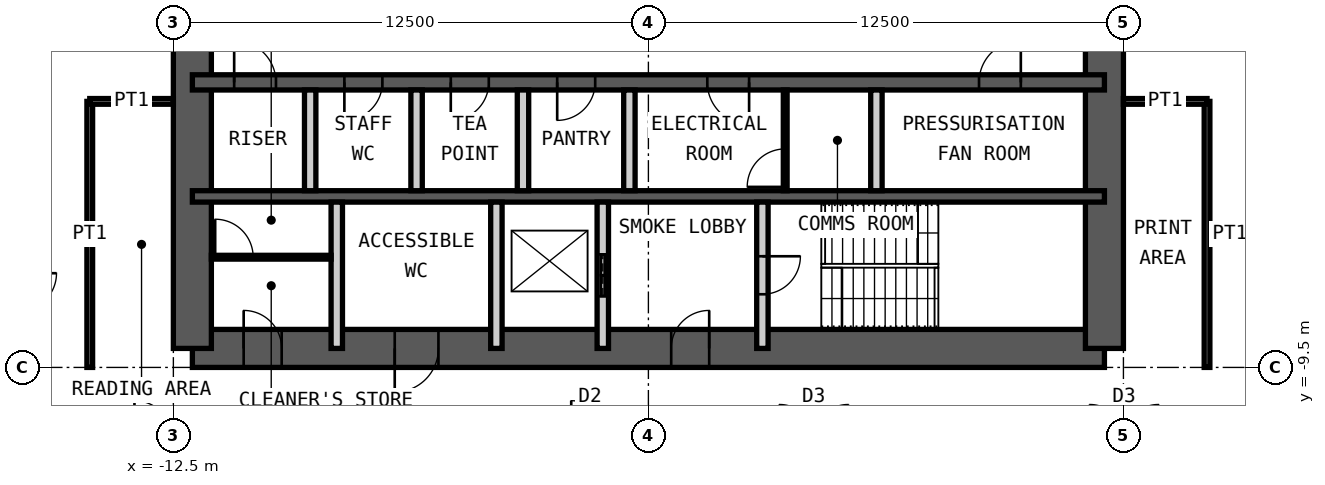
"""IFC4 building model, lengths in metres.
Left out: names, types, materials, properties, quantities, classifications, styles, units other than length and angle.
Written with IfcOpenShell. Run it as: python <this file> out.ifc"""

import sys

from ifc_helpers import new_model, si_unit, direction, frame, frame_2d, origin, place, context, subcontext, project, spatial, rectangle, extrude, element, fill, save


model = new_model("IFC4")
c1 = context("Model", 3, precision=1e-05, world=origin(), true_north=direction((0.0, 1.0)))
c2 = subcontext(c1, "Body", "Model", "MODEL_VIEW")
j1 = project(units=[si_unit("LENGTHUNIT", "METRE"), si_unit("PLANEANGLEUNIT", "RADIAN")], contexts=[c1])
p1 = place(None, origin())
s1 = spatial("IfcSite", under=j1, at=p1, CompositionType="ELEMENT")
p2 = place(p1, origin())
s2 = spatial("IfcBuilding", under=s1, at=p2, CompositionType="ELEMENT")
p3 = place(p2, frame((0.0, 0.0, 291.4)))
s3 = spatial("IfcBuildingStorey", under=s2, at=p3, CompositionType="ELEMENT", Elevation=291.4)
p4 = place(p3, frame((-12.0, -9.0, 0.0), z_axis=(0.0, 0.0, 1.0), x_axis=(1.0, 0.0, 0.0)))
e1 = element("IfcWall", 1, at=p4, inside=s3, PredefinedType="SHEAR", context=c2, shape_type="SweptSolid", body=[
    extrude(rectangle(XDim=24.0, YDim=1.0, at=frame_2d((12.0, 0.0))), origin(), (0.0, 0.0, 1.0), 4.2),
])
p5 = place(p4, frame((1.35, 0.0, 0.0)))
e2 = element("IfcOpeningElement", 2, at=p5, cuts=e1, PredefinedType="OPENING", context=c2, shape_type="SweptSolid", body=[
    extrude(rectangle(XDim=1.0, YDim=2.1, at=frame_2d((0.5, 1.05))), frame((0.0, 0.51, 0.0), z_axis=(0.0, -1.0, 0.0), x_axis=(1.0, 0.0, 0.0)), (0.0, 0.0, 1.0), 1.02),
])
p6 = place(p4, frame((5.325, 0.0, 0.0)))
e3 = element("IfcOpeningElement", 3, at=p6, cuts=e1, PredefinedType="OPENING", context=c2, shape_type="SweptSolid", body=[
    extrude(rectangle(XDim=1.15, YDim=2.1, at=frame_2d((0.575, 1.05))), frame((0.0, 0.51, 0.0), z_axis=(0.0, -1.0, 0.0), x_axis=(1.0, 0.0, 0.0)), (0.0, 0.0, 1.0), 1.02),
])
p7 = place(p4, frame((12.6, 0.0, 0.0)))
e4 = element("IfcOpeningElement", 4, at=p7, cuts=e1, PredefinedType="OPENING", context=c2, shape_type="SweptSolid", body=[
    extrude(rectangle(XDim=1.0, YDim=2.1, at=frame_2d((0.5, 1.05))), frame((0.0, 0.51, 0.0), z_axis=(0.0, -1.0, 0.0), x_axis=(1.0, 0.0, 0.0)), (0.0, 0.0, 1.0), 1.02),
])
p8 = place(p3, frame((12.0, -9.0, 0.0), z_axis=(0.0, 0.0, 1.0), x_axis=(0.0, 1.0, 0.0)))
e5 = element("IfcWall", 5, at=p8, inside=s3, PredefinedType="SHEAR", context=c2, shape_type="SweptSolid", body=[
    extrude(rectangle(XDim=18.0, YDim=1.0, at=frame_2d((9.0, 0.0))), origin(), (0.0, 0.0, 1.0), 4.2),
])
p9 = place(p8, frame((8.1, 0.0, 0.0)))
e6 = element("IfcOpeningElement", 6, at=p9, cuts=e5, PredefinedType="OPENING", context=c2, shape_type="SweptSolid", body=[
    extrude(rectangle(XDim=1.8, YDim=2.1, at=frame_2d((0.9, 1.05))), frame((0.0, 0.51, 0.0), z_axis=(0.0, -1.0, 0.0), x_axis=(1.0, 0.0, 0.0)), (0.0, 0.0, 1.0), 1.02),
])
p10 = place(p3, frame((-12.0, -9.0, 0.0), z_axis=(0.0, 0.0, 1.0), x_axis=(0.0, 1.0, 0.0)))
e7 = element("IfcWall", 7, at=p10, inside=s3, PredefinedType="SHEAR", context=c2, shape_type="SweptSolid", body=[
    extrude(rectangle(XDim=18.0, YDim=1.0, at=frame_2d((9.0, 0.0))), origin(), (0.0, 0.0, 1.0), 4.2),
])
p11 = place(p10, frame((8.1, 0.0, 0.0)))
e8 = element("IfcOpeningElement", 8, at=p11, cuts=e7, PredefinedType="OPENING", context=c2, shape_type="SweptSolid", body=[
    extrude(rectangle(XDim=1.8, YDim=2.1, at=frame_2d((0.9, 1.05))), frame((0.0, 0.51, 0.0), z_axis=(0.0, -1.0, 0.0), x_axis=(1.0, 0.0, 0.0)), (0.0, 0.0, 1.0), 1.02),
])
p12 = place(p3, frame((-12.0, -2.0, 0.0), z_axis=(0.0, 0.0, 1.0), x_axis=(1.0, 0.0, 0.0)))
e9 = element("IfcWall", 9, at=p12, inside=s3, PredefinedType="SHEAR", context=c2, shape_type="SweptSolid", body=[
    extrude(rectangle(XDim=24.0, YDim=0.4, at=frame_2d((12.0, 0.0))), origin(), (0.0, 0.0, 1.0), 4.2),
])
p13 = place(p12, frame((1.1, 0.0, 0.0)))
e10 = element("IfcOpeningElement", 10, at=p13, cuts=e9, PredefinedType="OPENING", context=c2, shape_type="SweptSolid", body=[
    extrude(rectangle(XDim=1.1, YDim=2.1, at=frame_2d((0.55, 1.05))), frame((0.0, 0.21, 0.0), z_axis=(0.0, -1.0, 0.0), x_axis=(1.0, 0.0, 0.0)), (0.0, 0.0, 1.0), 0.42),
])
p14 = place(p12, frame((13.55, 0.0, 0.0)))
e11 = element("IfcOpeningElement", 11, at=p14, cuts=e9, PredefinedType="OPENING", context=c2, shape_type="SweptSolid", body=[
    extrude(rectangle(XDim=1.1, YDim=2.1, at=frame_2d((0.55, 1.05))), frame((0.0, 0.21, 0.0), z_axis=(0.0, -1.0, 0.0), x_axis=(1.0, 0.0, 0.0)), (0.0, 0.0, 1.0), 0.42),
])
p15 = place(p12, frame((20.7, 0.0, 0.0)))
e12 = element("IfcOpeningElement", 12, at=p15, cuts=e9, PredefinedType="OPENING", context=c2, shape_type="SweptSolid", body=[
    extrude(rectangle(XDim=1.1, YDim=2.1, at=frame_2d((0.55, 1.05))), frame((0.0, 0.21, 0.0), z_axis=(0.0, -1.0, 0.0), x_axis=(1.0, 0.0, 0.0)), (0.0, 0.0, 1.0), 0.42),
])
p16 = place(p12, frame((4.0, 0.0, 0.0)))
e13 = element("IfcOpeningElement", 13, at=p16, cuts=e9, PredefinedType="OPENING", context=c2, shape_type="SweptSolid", body=[
    extrude(rectangle(XDim=1.0, YDim=2.1, at=frame_2d((0.5, 1.05))), frame((0.0, 0.21, 0.0), z_axis=(0.0, -1.0, 0.0), x_axis=(1.0, 0.0, 0.0)), (0.0, 0.0, 1.0), 0.42),
])
p17 = place(p12, frame((6.8, 0.0, 0.0)))
e14 = element("IfcOpeningElement", 14, at=p17, cuts=e9, PredefinedType="OPENING", context=c2, shape_type="SweptSolid", body=[
    extrude(rectangle(XDim=1.0, YDim=2.1, at=frame_2d((0.5, 1.05))), frame((0.0, 0.21, 0.0), z_axis=(0.0, -1.0, 0.0), x_axis=(1.0, 0.0, 0.0)), (0.0, 0.0, 1.0), 0.42),
])
p18 = place(p12, frame((9.6, 0.0, 0.0)))
e15 = element("IfcOpeningElement", 15, at=p18, cuts=e9, PredefinedType="OPENING", context=c2, shape_type="SweptSolid", body=[
    extrude(rectangle(XDim=1.0, YDim=2.1, at=frame_2d((0.5, 1.05))), frame((0.0, 0.21, 0.0), z_axis=(0.0, -1.0, 0.0), x_axis=(1.0, 0.0, 0.0)), (0.0, 0.0, 1.0), 0.42),
])
p19 = place(p3, frame((-12.0, -5.0, 0.0), z_axis=(0.0, 0.0, 1.0), x_axis=(1.0, 0.0, 0.0)))
e16 = element("IfcWall", 16, at=p19, inside=s3, PredefinedType="SHEAR", context=c2, shape_type="SweptSolid", body=[
    extrude(rectangle(XDim=24.0, YDim=0.3, at=frame_2d((12.0, 0.0))), origin(), (0.0, 0.0, 1.0), 4.2),
])
for number, where, z_axis, x_axis in (
    (17, (-8.9, -4.85, 0.0), (0.0, 0.0, 1.0), (0.0, 1.0, 0.0)),
    (18, (-6.1, -4.85, 0.0), (0.0, 0.0, 1.0), (0.0, 1.0, 0.0)),
    (19, (-3.3, -4.85, 0.0), (0.0, 0.0, 1.0), (0.0, 1.0, 0.0)),
    (20, (-0.5, -4.85, 0.0), (0.0, 0.0, 1.0), (0.0, 1.0, 0.0)),
    (21, (6.0, -4.85, 0.0), (0.0, 0.0, 1.0), (0.0, 1.0, 0.0)),
):
    element("IfcWall", number, at=place(p3, frame(where, z_axis=z_axis, x_axis=x_axis)), inside=s3, PredefinedType="PARTITIONING", context=c2, shape_type="SweptSolid", body=[
        extrude(rectangle(XDim=2.65, YDim=0.3, at=frame_2d((1.325, 0.0))), origin(), (0.0, 0.0, 1.0), 3.98),
    ])
for number, where, z_axis, x_axis in (
    (22, (-8.2, -9.0, 0.0), (0.0, 0.0, 1.0), (0.0, 1.0, 0.0)),
    (23, (-4.0, -9.0, 0.0), (0.0, 0.0, 1.0), (0.0, 1.0, 0.0)),
):
    element("IfcWall", number, at=place(p3, frame(where, z_axis=z_axis, x_axis=x_axis)), inside=s3, PredefinedType="PARTITIONING", context=c2, shape_type="SweptSolid", body=[
        extrude(rectangle(XDim=3.85, YDim=0.3, at=frame_2d((1.925, 0.0))), origin(), (0.0, 0.0, 1.0), 3.98),
    ])
p20 = place(p3, frame((-1.2, -9.0, 0.0), z_axis=(0.0, 0.0, 1.0), x_axis=(0.0, 1.0, 0.0)))
e24 = element("IfcWall", 24, at=p20, inside=s3, PredefinedType="PARTITIONING", context=c2, shape_type="SweptSolid", body=[
    extrude(rectangle(XDim=3.85, YDim=0.3, at=frame_2d((1.925, 0.0))), origin(), (0.0, 0.0, 1.0), 3.98),
])
p21 = place(p20, frame((1.375, 0.0, 0.0)))
e25 = element("IfcOpeningElement", 25, at=p21, cuts=e24, PredefinedType="OPENING", context=c2, shape_type="SweptSolid", body=[
    extrude(rectangle(XDim=1.1, YDim=2.4, at=frame_2d((0.55, 1.2))), frame((0.0, 0.16, 0.0), z_axis=(0.0, -1.0, 0.0), x_axis=(1.0, 0.0, 0.0)), (0.0, 0.0, 1.0), 0.32),
])
p22 = place(p3, frame((3.0, -9.0, 0.0), z_axis=(0.0, 0.0, 1.0), x_axis=(0.0, 1.0, 0.0)))
e26 = element("IfcWall", 26, at=p22, inside=s3, PredefinedType="PARTITIONING", context=c2, shape_type="SweptSolid", body=[
    extrude(rectangle(XDim=3.85, YDim=0.3, at=frame_2d((1.925, 0.0))), origin(), (0.0, 0.0, 1.0), 3.98),
])
p23 = place(p22, frame((1.425, 0.0, 0.0)))
e27 = element("IfcOpeningElement", 27, at=p23, cuts=e26, PredefinedType="OPENING", context=c2, shape_type="SweptSolid", body=[
    extrude(rectangle(XDim=1.0, YDim=2.1, at=frame_2d((0.5, 1.05))), frame((0.0, 0.16, 0.0), z_axis=(0.0, -1.0, 0.0), x_axis=(1.0, 0.0, 0.0)), (0.0, 0.0, 1.0), 0.32),
])
p24 = place(p3, frame((3.6, -4.85, 0.0), z_axis=(0.0, 0.0, 1.0), x_axis=(0.0, 1.0, 0.0)))
e28 = element("IfcWall", 28, at=p24, inside=s3, PredefinedType="PARTITIONING", context=c2, shape_type="SweptSolid", body=[
    extrude(rectangle(XDim=2.65, YDim=0.1, at=frame_2d((1.325, 0.0))), origin(), (0.0, 0.0, 1.0), 3.98),
])
p25 = place(p24, frame((0.1, 0.0, 0.0)))
e29 = element("IfcOpeningElement", 29, at=p25, cuts=e28, PredefinedType="OPENING", context=c2, shape_type="SweptSolid", body=[
    extrude(rectangle(XDim=1.0, YDim=2.4, at=frame_2d((0.5, 1.2))), frame((0.0, 0.06, 0.0), z_axis=(0.0, -1.0, 0.0), x_axis=(1.0, 0.0, 0.0)), (0.0, 0.0, 1.0), 0.12),
])
p26 = place(p3, frame((-11.5, -6.6, 0.0), z_axis=(0.0, 0.0, 1.0), x_axis=(1.0, 0.0, 0.0)))
e30 = element("IfcWall", 30, at=p26, inside=s3, PredefinedType="PARTITIONING", context=c2, shape_type="SweptSolid", body=[
    extrude(rectangle(XDim=3.15, YDim=0.1, at=frame_2d((1.575, 0.0))), origin(), (0.0, 0.0, 1.0), 3.98),
])
p27 = place(p26, frame((0.1, 0.0, 0.0)))
e31 = element("IfcOpeningElement", 31, at=p27, cuts=e30, PredefinedType="OPENING", context=c2, shape_type="SweptSolid", body=[
    extrude(rectangle(XDim=1.0, YDim=2.4, at=frame_2d((0.5, 1.2))), frame((0.0, 0.06, 0.0), z_axis=(0.0, -1.0, 0.0), x_axis=(1.0, 0.0, 0.0)), (0.0, 0.0, 1.0), 0.12),
])
p28 = place(p3, frame((14.7, -9.5, 0.0), z_axis=(0.0, 0.0, 1.0), x_axis=(0.0, 1.0, 0.0)))
e32 = element("IfcWall", 32, at=p28, inside=s3, PredefinedType="PARTITIONING", context=c2, shape_type="SweptSolid", body=[
    extrude(rectangle(XDim=7.0, YDim=0.15, at=frame_2d((3.5, 0.0))), origin(), (0.0, 0.0, 1.0), 4.03),
])
p29 = place(p3, frame((12.5, -2.5, 0.0), z_axis=(0.0, 0.0, 1.0), x_axis=(1.0, 0.0, 0.0)))
e33 = element("IfcWall", 33, at=p29, inside=s3, PredefinedType="PARTITIONING", context=c2, shape_type="SweptSolid", body=[
    extrude(rectangle(XDim=2.2, YDim=0.15, at=frame_2d((1.1, 0.0))), origin(), (0.0, 0.0, 1.0), 3.33),
])
p30 = place(p3, frame((-14.7, -9.5, 0.0), z_axis=(0.0, 0.0, 1.0), x_axis=(0.0, 1.0, 0.0)))
e34 = element("IfcWall", 34, at=p30, inside=s3, PredefinedType="PARTITIONING", context=c2, shape_type="SweptSolid", body=[
    extrude(rectangle(XDim=7.0, YDim=0.15, at=frame_2d((3.5, 0.0))), origin(), (0.0, 0.0, 1.0), 4.03),
])
p31 = place(p3, frame((-12.5, -2.5, 0.0), z_axis=(0.0, 0.0, 1.0), x_axis=(-1.0, 0.0, 0.0)))
e35 = element("IfcWall", 35, at=p31, inside=s3, PredefinedType="PARTITIONING", context=c2, shape_type="SweptSolid", body=[
    extrude(rectangle(XDim=2.2, YDim=0.15, at=frame_2d((1.1, 0.0))), origin(), (0.0, 0.0, 1.0), 3.53),
])
p32 = place(p5, origin())
e36 = element("IfcDoor", 36, at=p32, inside=s3, OperationType="SINGLE_SWING_RIGHT", PredefinedType="DOOR", context=c2, shape_type="SweptSolid", body=[
    extrude(rectangle(XDim=1.0, YDim=2.1, at=frame_2d((0.5, 1.05))), frame((0.0, 0.025, 0.0), z_axis=(0.0, -1.0, 0.0), x_axis=(1.0, 0.0, 0.0)), (0.0, 0.0, 1.0), 0.05),
])
fill(e2, e36)
p33 = place(p6, origin())
e37 = element("IfcDoor", 37, at=p33, inside=s3, OperationType="SINGLE_SWING_LEFT", PredefinedType="DOOR", context=c2, shape_type="SweptSolid", body=[
    extrude(rectangle(XDim=1.15, YDim=2.1, at=frame_2d((0.575, 1.05))), frame((0.0, 0.025, 0.0), z_axis=(0.0, -1.0, 0.0), x_axis=(1.0, 0.0, 0.0)), (0.0, 0.0, 1.0), 0.05),
])
fill(e3, e37)
p34 = place(p7, origin())
e38 = element("IfcDoor", 38, at=p34, inside=s3, OperationType="SINGLE_SWING_LEFT", PredefinedType="DOOR", context=c2, shape_type="SweptSolid", body=[
    extrude(rectangle(XDim=1.0, YDim=2.1, at=frame_2d((0.5, 1.05))), frame((0.0, 0.025, 0.0), z_axis=(0.0, -1.0, 0.0), x_axis=(1.0, 0.0, 0.0)), (0.0, 0.0, 1.0), 0.05),
])
fill(e4, e38)
p35 = place(p23, origin())
e39 = element("IfcDoor", 39, at=p35, inside=s3, OperationType="SINGLE_SWING_RIGHT", PredefinedType="DOOR", context=c2, shape_type="SweptSolid", body=[
    extrude(rectangle(XDim=1.0, YDim=2.1, at=frame_2d((0.5, 1.05))), frame((0.0, 0.025, 0.0), z_axis=(0.0, -1.0, 0.0), x_axis=(1.0, 0.0, 0.0)), (0.0, 0.0, 1.0), 0.05),
])
fill(e27, e39)
p36 = place(p13, origin())
e40 = element("IfcDoor", 40, at=p36, inside=s3, OperationType="SINGLE_SWING_RIGHT", PredefinedType="DOOR", context=c2, shape_type="SweptSolid", body=[
    extrude(rectangle(XDim=1.1, YDim=2.1, at=frame_2d((0.55, 1.05))), frame((0.0, 0.025, 0.0), z_axis=(0.0, -1.0, 0.0), x_axis=(1.0, 0.0, 0.0)), (0.0, 0.0, 1.0), 0.05),
])
fill(e10, e40)
p37 = place(p14, origin())
e41 = element("IfcDoor", 41, at=p37, inside=s3, OperationType="SINGLE_SWING_RIGHT", PredefinedType="DOOR", context=c2, shape_type="SweptSolid", body=[
    extrude(rectangle(XDim=1.1, YDim=2.1, at=frame_2d((0.55, 1.05))), frame((0.0, 0.025, 0.0), z_axis=(0.0, -1.0, 0.0), x_axis=(1.0, 0.0, 0.0)), (0.0, 0.0, 1.0), 0.05),
])
fill(e11, e41)
p38 = place(p15, origin())
e42 = element("IfcDoor", 42, at=p38, inside=s3, OperationType="SINGLE_SWING_LEFT", PredefinedType="DOOR", context=c2, shape_type="SweptSolid", body=[
    extrude(rectangle(XDim=1.1, YDim=2.1, at=frame_2d((0.55, 1.05))), frame((0.0, 0.025, 0.0), z_axis=(0.0, -1.0, 0.0), x_axis=(1.0, 0.0, 0.0)), (0.0, 0.0, 1.0), 0.05),
])
fill(e12, e42)
p39 = place(p21, origin())
e43 = element("IfcDoor", 43, at=p39, inside=s3, OperationType="DOUBLE_DOOR_SLIDING", PredefinedType="DOOR", context=c2, shape_type="SweptSolid", body=[
    extrude(rectangle(XDim=1.1, YDim=2.4, at=frame_2d((0.55, 1.2))), frame((0.0, 0.025, 0.0), z_axis=(0.0, -1.0, 0.0), x_axis=(1.0, 0.0, 0.0)), (0.0, 0.0, 1.0), 0.05),
])
fill(e25, e43)
p40 = place(p16, origin())
e44 = element("IfcDoor", 44, at=p40, inside=s3, OperationType="SINGLE_SWING_LEFT", PredefinedType="DOOR", context=c2, shape_type="SweptSolid", body=[
    extrude(rectangle(XDim=1.0, YDim=2.1, at=frame_2d((0.5, 1.05))), frame((0.0, 0.025, 0.0), z_axis=(0.0, -1.0, 0.0), x_axis=(1.0, 0.0, 0.0)), (0.0, 0.0, 1.0), 0.05),
])
fill(e13, e44)
p41 = place(p17, origin())
e45 = element("IfcDoor", 45, at=p41, inside=s3, OperationType="SINGLE_SWING_LEFT", PredefinedType="DOOR", context=c2, shape_type="SweptSolid", body=[
    extrude(rectangle(XDim=1.0, YDim=2.1, at=frame_2d((0.5, 1.05))), frame((0.0, 0.025, 0.0), z_axis=(0.0, -1.0, 0.0), x_axis=(1.0, 0.0, 0.0)), (0.0, 0.0, 1.0), 0.05),
])
fill(e14, e45)
p42 = place(p18, origin())
e46 = element("IfcDoor", 46, at=p42, inside=s3, OperationType="SINGLE_SWING_LEFT", PredefinedType="DOOR", context=c2, shape_type="SweptSolid", body=[
    extrude(rectangle(XDim=1.0, YDim=2.1, at=frame_2d((0.5, 1.05))), frame((0.0, 0.025, 0.0), z_axis=(0.0, -1.0, 0.0), x_axis=(1.0, 0.0, 0.0)), (0.0, 0.0, 1.0), 0.05),
])
fill(e15, e46)
p43 = place(p25, origin())
e47 = element("IfcDoor", 47, at=p43, inside=s3, OperationType="SINGLE_SWING_RIGHT", PredefinedType="DOOR", context=c2, shape_type="SweptSolid", body=[
    extrude(rectangle(XDim=1.0, YDim=2.4, at=frame_2d((0.5, 1.2))), frame((0.0, 0.025, 0.0), z_axis=(0.0, -1.0, 0.0), x_axis=(1.0, 0.0, 0.0)), (0.0, 0.0, 1.0), 0.05),
])
fill(e29, e47)
p44 = place(p27, origin())
e48 = element("IfcDoor", 48, at=p44, inside=s3, OperationType="SINGLE_SWING_RIGHT", PredefinedType="DOOR", context=c2, shape_type="SweptSolid", body=[
    extrude(rectangle(XDim=1.0, YDim=2.4, at=frame_2d((0.5, 1.2))), frame((0.0, 0.025, 0.0), z_axis=(0.0, -1.0, 0.0), x_axis=(1.0, 0.0, 0.0)), (0.0, 0.0, 1.0), 0.05),
])
fill(e31, e48)
save(model, sys.argv[1])
